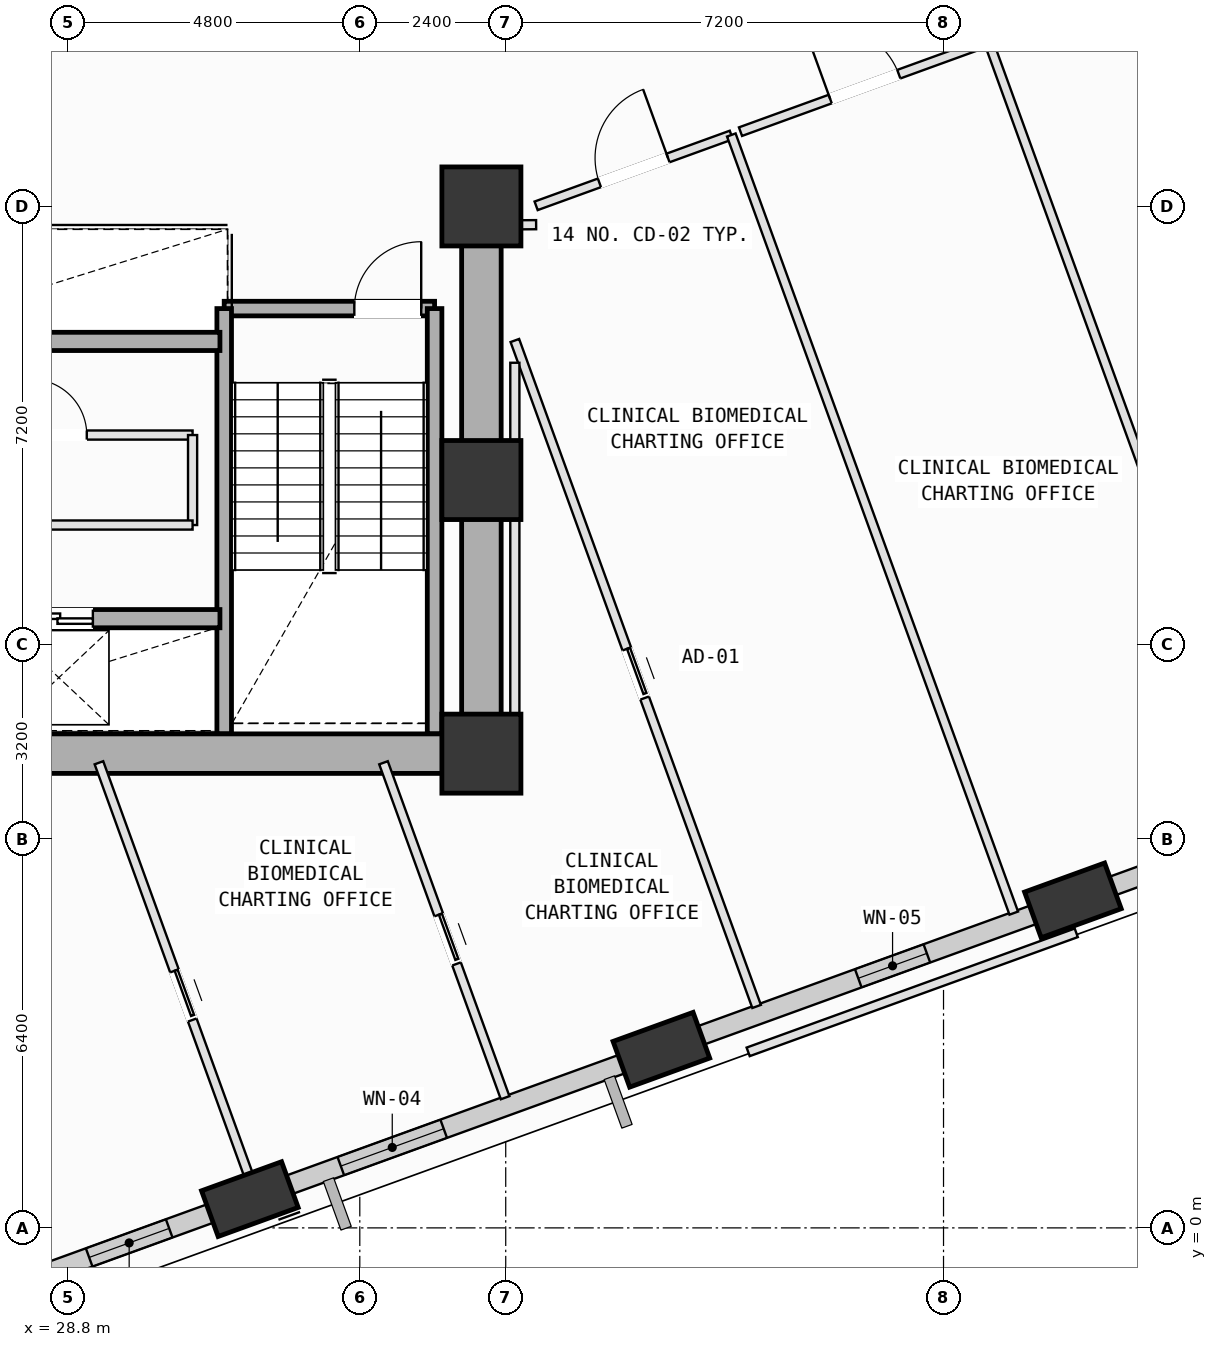
"""IFC4 building model, lengths in metres.
Left out: names, types, materials, properties, quantities, classifications, styles, units other than length and angle.
Written with IfcOpenShell. Run it as: python <this file> out.ifc"""

import sys

from ifc_helpers import new_model, si_unit, direction, frame, frame_2d, origin, origin_2d, place, context, subcontext, project, spatial, rectangle, extrude, element, fill, save


model = new_model("IFC4")
c1 = context("Model", 3, precision=1e-05, world=origin(), true_north=direction((0.0, 1.0)))
c2 = subcontext(c1, "Body", "Model", "MODEL_VIEW")
j1 = project(units=[si_unit("LENGTHUNIT", "METRE"), si_unit("PLANEANGLEUNIT", "RADIAN")], contexts=[c1])
p1 = place(None, origin())
s1 = spatial("IfcSite", under=j1, at=p1, CompositionType="ELEMENT")
p2 = place(p1, origin())
s2 = spatial("IfcBuilding", under=s1, at=p2, CompositionType="ELEMENT")
p3 = place(p2, frame((0.0, 0.0, 108.4)))
s3 = spatial("IfcBuildingStorey", under=s2, at=p3, CompositionType="ELEMENT", Elevation=108.4)
for number, where, z_axis, x_axis in (
    (1, (35.6, 7.8, 0.0), (0.0, 0.0, 1.0), (1.0, 0.0, 0.0)),
    (2, (35.6, 12.3, 0.0), (0.0, 0.0, 1.0), (1.0, 0.0, 0.0)),
    (3, (35.6, 16.8, 0.0), (0.0, 0.0, 1.0), (1.0, 0.0, 0.0)),
):
    element("IfcColumn", number, at=place(p3, frame(where, z_axis=z_axis, x_axis=x_axis)), inside=s3, PredefinedType="COLUMN", context=c2, shape_type="SweptSolid", body=[
        extrude(rectangle(XDim=1.3, YDim=1.3, at=origin_2d()), origin(), (0.0, 0.0, 1.0), 4.0),
    ])
p4 = place(p3, frame((31.792, 0.473, 0.002), z_axis=(0.100410199707, -0.006625128189, 0.994924067189), x_axis=(-0.276844928349, 0.960301010677, 0.034334451206)))
e4 = element("IfcColumn", 4, at=p4, inside=s3, PredefinedType="COLUMN", context=c2, shape_type="SweptSolid", body=[
    extrude(rectangle(XDim=1.4, YDim=0.8, at=origin_2d()), origin(), (0.0, 0.0, 1.0), 4.017),
])
p5 = place(p3, frame((38.56, 2.93, 0.002), z_axis=(0.090087537586, 0.02122927118, 0.995707564306), x_axis=(-0.546282636137, 0.837005375033, 0.03157979768)))
e5 = element("IfcColumn", 5, at=p5, inside=s3, PredefinedType="COLUMN", context=c2, shape_type="SweptSolid", body=[
    extrude(rectangle(XDim=1.4, YDim=0.8, at=origin_2d()), origin(), (0.0, 0.0, 1.0), 4.014),
])
p6 = place(p3, frame((45.328, 5.386, 0.002), z_axis=(0.079678110457, 0.049084148961, 0.9956114428), x_axis=(-0.78224874538, 0.62214735669, 0.031930657927)))
e6 = element("IfcColumn", 6, at=p6, inside=s3, PredefinedType="COLUMN", context=c2, shape_type="SweptSolid", body=[
    extrude(rectangle(XDim=1.4, YDim=0.8, at=origin_2d()), origin(), (0.0, 0.0, 1.0), 4.014),
])
p7 = place(p3, frame((31.506, 0.369, 0.0), z_axis=(0.0, 0.0, 1.0), x_axis=(-0.939986506667, -0.341211616572, 0.0)))
e7 = element("IfcWall", 7, at=p7, inside=s3, PredefinedType="SOLIDWALL", context=c2, shape_type="SweptSolid", body=[
    extrude(rectangle(XDim=6.234, YDim=0.32, at=frame_2d((3.117, 0.0))), origin(), (0.0, 0.0, 1.0), 3.165),
])
p8 = place(p7, frame((1.107, 0.0, 0.75)))
e8 = element("IfcOpeningElement", 8, at=p8, cuts=e7, PredefinedType="OPENING", context=c2, shape_type="SweptSolid", body=[
    extrude(rectangle(XDim=1.4, YDim=1.85, at=frame_2d((0.7, 0.925))), frame((0.0, 0.17, 0.0), z_axis=(0.0, -1.0, 0.0), x_axis=(1.0, 0.0, 0.0)), (0.0, 0.0, 1.0), 0.34),
])
p9 = place(p3, frame((38.267, 2.824, 0.0), z_axis=(0.0, 0.0, 1.0), x_axis=(-0.939987127701, -0.341209905713, 0.0)))
e9 = element("IfcWall", 9, at=p9, inside=s3, PredefinedType="SOLIDWALL", context=c2, shape_type="SweptSolid", body=[
    extrude(rectangle(XDim=6.214, YDim=0.32, at=frame_2d((3.107, 0.0))), origin(), (0.0, 0.0, 1.0), 3.165),
])
p10 = place(p9, frame((3.497, 0.0, 0.75)))
e10 = element("IfcOpeningElement", 10, at=p10, cuts=e9, PredefinedType="OPENING", context=c2, shape_type="SweptSolid", body=[
    extrude(rectangle(XDim=1.8, YDim=2.05, at=frame_2d((0.9, 1.025))), frame((0.0, 0.17, 0.0), z_axis=(0.0, -1.0, 0.0), x_axis=(1.0, 0.0, 0.0)), (0.0, 0.0, 1.0), 0.34),
])
p11 = place(p3, frame((45.036, 5.281, 0.0), z_axis=(0.0, 0.0, 1.0), x_axis=(-0.93999646123, -0.341184192006, 0.0)))
e11 = element("IfcWall", 11, at=p11, inside=s3, PredefinedType="SOLIDWALL", context=c2, shape_type="SweptSolid", body=[
    extrude(rectangle(XDim=6.209, YDim=0.32, at=frame_2d((3.104, 0.0))), origin(), (0.0, 0.0, 1.0), 3.165),
])
p12 = place(p11, frame((2.244, 0.0, 0.75)))
e12 = element("IfcOpeningElement", 12, at=p12, cuts=e11, PredefinedType="OPENING", context=c2, shape_type="SweptSolid", body=[
    extrude(rectangle(XDim=1.2, YDim=1.75, at=frame_2d((0.6, 0.875))), frame((0.0, 0.17, 0.0), z_axis=(0.0, -1.0, 0.0), x_axis=(1.0, 0.0, 0.0)), (0.0, 0.0, 1.0), 0.34),
])
p13 = place(p3, frame((51.811, 7.74, 0.0), z_axis=(0.0, 0.0, 1.0), x_axis=(-0.939992730325, -0.341194470846, 0.0)))
e13 = element("IfcWall", 13, at=p13, inside=s3, PredefinedType="SOLIDWALL", context=c2, shape_type="SweptSolid", body=[
    extrude(rectangle(XDim=6.218, YDim=0.32, at=frame_2d((3.109, 0.0))), origin(), (0.0, 0.0, 1.0), 3.165),
])
p14 = place(p13, frame((0.708, 0.0, 0.75)))
e14 = element("IfcOpeningElement", 14, at=p14, cuts=e13, PredefinedType="OPENING", context=c2, shape_type="SweptSolid", body=[
    extrude(rectangle(XDim=1.6, YDim=1.95, at=frame_2d((0.8, 0.975))), frame((0.0, 0.17, 0.0), z_axis=(0.0, -1.0, 0.0), x_axis=(1.0, 0.0, 0.0)), (0.0, 0.0, 1.0), 0.34),
])
p15 = place(p3, frame((31.37, 15.12, 0.0), z_axis=(0.0, 0.0, 1.0), x_axis=(1.0, 0.0, 0.0)))
e15 = element("IfcWall", 15, at=p15, inside=s3, PredefinedType="SOLIDWALL", context=c2, shape_type="SweptSolid", body=[
    extrude(rectangle(XDim=3.46, YDim=0.24, at=frame_2d((1.73, 0.0))), origin(), (0.0, 0.0, 1.0), 3.78),
])
p16 = place(p15, frame((2.14, 0.0, 0.0)))
e16 = element("IfcOpeningElement", 16, at=p16, cuts=e15, PredefinedType="OPENING", context=c2, shape_type="SweptSolid", body=[
    extrude(rectangle(XDim=1.1, YDim=2.15, at=frame_2d((0.55, 1.075))), frame((0.0, 0.13, 0.0), z_axis=(0.0, -1.0, 0.0), x_axis=(1.0, 0.0, 0.0)), (0.0, 0.0, 1.0), 0.26),
])
for number, where, z_axis, x_axis in (
    (17, (34.83, 15.12, 0.0), (0.0, 0.0, 1.0), (0.0, -1.0, 0.0)),
    (18, (31.37, 8.125, 0.0), (0.0, 0.0, 1.0), (0.0, 1.0, 0.0)),
):
    element("IfcWall", number, at=place(p3, frame(where, z_axis=z_axis, x_axis=x_axis)), inside=s3, PredefinedType="SOLIDWALL", context=c2, shape_type="SweptSolid", body=[
        extrude(rectangle(XDim=6.995, YDim=0.24, at=frame_2d((3.498, 0.0))), origin(), (0.0, 0.0, 1.0), 3.78),
    ])
p17 = place(p3, frame((24.8, 7.8, 0.0), z_axis=(0.0, 0.0, 1.0), x_axis=(1.0, 0.0, 0.0)))
e19 = element("IfcWall", 19, at=p17, inside=s3, PredefinedType="SHEAR", context=c2, shape_type="SweptSolid", body=[
    extrude(rectangle(XDim=10.8, YDim=0.65, at=frame_2d((5.4, 0.0))), origin(), (0.0, 0.0, 1.0), 3.78),
])
p18 = place(p3, frame((35.6, 7.8, 0.0), z_axis=(0.0, 0.0, 1.0), x_axis=(0.0, 1.0, 0.0)))
e20 = element("IfcWall", 20, at=p18, inside=s3, PredefinedType="SHEAR", context=c2, shape_type="SweptSolid", body=[
    extrude(rectangle(XDim=9.0, YDim=0.65, at=frame_2d((4.5, 0.0))), origin(), (0.0, 0.0, 1.0), 3.78),
])
p19 = place(p3, frame((25.85, 10.02, 0.0), z_axis=(0.0, 0.0, 1.0), x_axis=(1.0, 0.0, 0.0)))
e21 = element("IfcWall", 21, at=p19, inside=s3, PredefinedType="SOLIDWALL", context=c2, shape_type="SweptSolid", body=[
    extrude(rectangle(XDim=5.45, YDim=0.3, at=frame_2d((2.725, 0.0))), origin(), (0.0, 0.0, 1.0), 3.78),
])
p20 = place(p19, frame((0.34, 0.0, 0.0)))
e22 = element("IfcOpeningElement", 22, at=p20, cuts=e21, PredefinedType="OPENING", context=c2, shape_type="SweptSolid", body=[
    extrude(rectangle(XDim=1.12, YDim=2.15, at=frame_2d((0.56, 1.075))), frame((0.0, 0.16, 0.0), z_axis=(0.0, -1.0, 0.0), x_axis=(1.0, 0.0, 0.0)), (0.0, 0.0, 1.0), 0.32),
])
p21 = place(p19, frame((2.24, 0.0, 0.0)))
e23 = element("IfcOpeningElement", 23, at=p21, cuts=e21, PredefinedType="OPENING", context=c2, shape_type="SweptSolid", body=[
    extrude(rectangle(XDim=1.12, YDim=2.15, at=frame_2d((0.56, 1.075))), frame((0.0, 0.16, 0.0), z_axis=(0.0, -1.0, 0.0), x_axis=(1.0, 0.0, 0.0)), (0.0, 0.0, 1.0), 0.32),
])
p22 = place(p3, frame((25.85, 14.58, 0.0), z_axis=(0.0, 0.0, 1.0), x_axis=(1.0, 0.0, 0.0)))
e24 = element("IfcWall", 24, at=p22, inside=s3, PredefinedType="SOLIDWALL", context=c2, shape_type="SweptSolid", body=[
    extrude(rectangle(XDim=5.45, YDim=0.3, at=frame_2d((2.725, 0.0))), origin(), (0.0, 0.0, 1.0), 3.78),
])
p23 = place(p3, frame((26.45, 13.04, 0.0), z_axis=(0.0, 0.0, 1.0), x_axis=(1.0, 0.0, 0.0)))
e25 = element("IfcWall", 25, at=p23, inside=s3, PredefinedType="PARTITIONING", context=c2, shape_type="SweptSolid", body=[
    extrude(rectangle(XDim=4.4, YDim=0.15, at=frame_2d((2.2, 0.0))), origin(), (0.0, 0.0, 1.0), 3.78),
])
p24 = place(p23, frame((1.74, 0.0, 0.0)))
e26 = element("IfcOpeningElement", 26, at=p24, cuts=e25, PredefinedType="OPENING", context=c2, shape_type="SweptSolid", body=[
    extrude(rectangle(XDim=0.92, YDim=2.1, at=frame_2d((0.46, 1.05))), frame((0.0, 0.085, 0.0), z_axis=(0.0, -1.0, 0.0), x_axis=(1.0, 0.0, 0.0)), (0.0, 0.0, 1.0), 0.17),
])
p25 = place(p3, frame((30.85, 13.04, 0.0), z_axis=(0.0, 0.0, 1.0), x_axis=(0.0, -1.0, 0.0)))
e27 = element("IfcWall", 27, at=p25, inside=s3, PredefinedType="PARTITIONING", context=c2, shape_type="SweptSolid", body=[
    extrude(rectangle(XDim=1.48, YDim=0.15, at=frame_2d((0.74, 0.0))), origin(), (0.0, 0.0, 1.0), 3.78),
])
p26 = place(p3, frame((30.85, 11.56, 0.0), z_axis=(0.0, 0.0, 1.0), x_axis=(-1.0, 0.0, 0.0)))
e28 = element("IfcWall", 28, at=p26, inside=s3, PredefinedType="PARTITIONING", context=c2, shape_type="SweptSolid", body=[
    extrude(rectangle(XDim=4.4, YDim=0.15, at=frame_2d((2.2, 0.0))), origin(), (0.0, 0.0, 1.0), 3.78),
])
p27 = place(p3, frame((29.31, 7.65, 0.0), z_axis=(0.0, 0.0, 1.0), x_axis=(0.341041356656, -0.940048292935, 0.0)))
e29 = element("IfcWall", 29, at=p27, inside=s3, PredefinedType="PARTITIONING", context=c2, shape_type="SweptSolid", body=[
    extrude(rectangle(XDim=7.823, YDim=0.15, at=frame_2d((3.912, 0.0))), origin(), (0.0, 0.0, 1.0), 3.78),
])
p28 = place(p27, frame((3.641, 0.0, 0.0)))
e30 = element("IfcOpeningElement", 30, at=p28, cuts=e29, PredefinedType="OPENING", context=c2, shape_type="SweptSolid", body=[
    extrude(rectangle(XDim=0.86, YDim=2.06, at=frame_2d((0.43, 1.03))), frame((0.0, 0.085, 0.0), z_axis=(0.0, -1.0, 0.0), x_axis=(1.0, 0.0, 0.0)), (0.0, 0.0, 1.0), 0.17),
])
p29 = place(p3, frame((33.99, 7.65, 0.0), z_axis=(0.0, 0.0, 1.0), x_axis=(0.341261367951, -0.939968445611, 0.0)))
e31 = element("IfcWall", 31, at=p29, inside=s3, PredefinedType="PARTITIONING", context=c2, shape_type="SweptSolid", body=[
    extrude(rectangle(XDim=5.861, YDim=0.15, at=frame_2d((2.93, 0.0))), origin(), (0.0, 0.0, 1.0), 3.78),
])
p30 = place(p29, frame((2.66, 0.0, 0.0)))
e32 = element("IfcOpeningElement", 32, at=p30, cuts=e31, PredefinedType="OPENING", context=c2, shape_type="SweptSolid", body=[
    extrude(rectangle(XDim=0.86, YDim=2.06, at=frame_2d((0.43, 1.03))), frame((0.0, 0.085, 0.0), z_axis=(0.0, -1.0, 0.0), x_axis=(1.0, 0.0, 0.0)), (0.0, 0.0, 1.0), 0.17),
])
p31 = place(p3, frame((36.15, 14.595, 0.0), z_axis=(0.0, 0.0, 1.0), x_axis=(0.341228228972, -0.939980476261, 0.0)))
e33 = element("IfcWall", 33, at=p31, inside=s3, PredefinedType="PARTITIONING", context=c2, shape_type="SweptSolid", body=[
    extrude(rectangle(XDim=11.652, YDim=0.15, at=frame_2d((5.826, 0.0))), origin(), (0.0, 0.0, 1.0), 3.78),
])
p32 = place(p31, frame((5.396, 0.0, 0.0)))
e34 = element("IfcOpeningElement", 34, at=p32, cuts=e33, PredefinedType="OPENING", context=c2, shape_type="SweptSolid", body=[
    extrude(rectangle(XDim=0.86, YDim=2.06, at=frame_2d((0.43, 1.03))), frame((0.0, 0.085, 0.0), z_axis=(0.0, -1.0, 0.0), x_axis=(1.0, 0.0, 0.0)), (0.0, 0.0, 1.0), 0.17),
])
p33 = place(p3, frame((39.278, 2.946, 0.0), z_axis=(0.0, 0.0, 1.0), x_axis=(-0.94005912582, -0.341011495354, 0.0)))
e35 = element("IfcWall", 35, at=p33, inside=s3, PredefinedType="PARTITIONING", context=c2, shape_type="SweptSolid", body=[
    extrude(rectangle(XDim=0.991, YDim=0.15, at=frame_2d((0.496, 0.0))), origin(), (0.0, 0.0, 1.0), 3.165),
])
p34 = place(p3, frame((35.6, 7.5, 0.0), z_axis=(0.0, 0.0, 1.0), x_axis=(1.0, 0.0, 0.0)))
e36 = element("IfcWall", 36, at=p34, inside=s3, PredefinedType="PARTITIONING", context=c2, shape_type="SweptSolid", body=[
    extrude(rectangle(XDim=0.55, YDim=0.15, at=frame_2d((0.275, 0.0))), origin(), (0.0, 0.0, 1.0), 2.965),
])
p35 = place(p3, frame((36.15, 7.5, 0.0), z_axis=(0.0, 0.0, 1.0), x_axis=(0.0, 1.0, 0.0)))
e37 = element("IfcWall", 37, at=p35, inside=s3, PredefinedType="PARTITIONING", context=c2, shape_type="SweptSolid", body=[
    extrude(rectangle(XDim=6.729, YDim=0.15, at=frame_2d((3.365, 0.0))), origin(), (0.0, 0.0, 1.0), 3.78),
])
p36 = place(p3, frame((35.631, 16.494, 0.0), z_axis=(0.0, 0.0, 1.0), x_axis=(0.999975329499, 0.007024271772, 0.0)))
e38 = element("IfcWall", 38, at=p36, inside=s3, PredefinedType="PARTITIONING", context=c2, shape_type="SweptSolid", body=[
    extrude(rectangle(XDim=0.869, YDim=0.15, at=frame_2d((0.435, 0.0))), origin(), (0.0, 0.0, 1.0), 2.965),
])
p37 = place(p3, frame((36.5, 16.81, 0.0), z_axis=(0.0, 0.0, 1.0), x_axis=(0.94000198953, 0.341168960605, 0.0)))
e39 = element("IfcWall", 39, at=p37, inside=s3, PredefinedType="PARTITIONING", context=c2, shape_type="SweptSolid", body=[
    extrude(rectangle(XDim=3.415, YDim=0.15, at=frame_2d((1.708, 0.0))), origin(), (0.0, 0.0, 1.0), 2.965),
])
p38 = place(p37, frame((1.107, 0.0, 0.0)))
e40 = element("IfcOpeningElement", 40, at=p38, cuts=e39, PredefinedType="OPENING", context=c2, shape_type="SweptSolid", body=[
    extrude(rectangle(XDim=1.2, YDim=2.15, at=frame_2d((0.6, 1.075))), frame((0.0, 0.085, 0.0), z_axis=(0.0, -1.0, 0.0), x_axis=(1.0, 0.0, 0.0)), (0.0, 0.0, 1.0), 0.17),
])
p39 = place(p3, frame((39.71, 17.975, 0.0), z_axis=(0.0, 0.0, 1.0), x_axis=(0.341169968064, -0.940001623877, 0.0)))
e41 = element("IfcWall", 41, at=p39, inside=s3, PredefinedType="PARTITIONING", context=c2, shape_type="SweptSolid", body=[
    extrude(rectangle(XDim=13.615, YDim=0.15, at=frame_2d((6.808, 0.0))), origin(), (0.0, 0.0, 1.0), 3.78),
])
p40 = place(p3, frame((39.861, 18.03, 0.0), z_axis=(0.0, 0.0, 1.0), x_axis=(0.939960863027, 0.341282252656, 0.0)))
e42 = element("IfcWall", 42, at=p40, inside=s3, PredefinedType="PARTITIONING", context=c2, shape_type="SweptSolid", body=[
    extrude(rectangle(XDim=4.339, YDim=0.15, at=frame_2d((2.17, 0.0))), origin(), (0.0, 0.0, 1.0), 2.965),
])
p41 = place(p40, frame((1.57, 0.0, 0.0)))
e43 = element("IfcOpeningElement", 43, at=p41, cuts=e42, PredefinedType="OPENING", context=c2, shape_type="SweptSolid", body=[
    extrude(rectangle(XDim=1.2, YDim=2.15, at=frame_2d((0.6, 1.075))), frame((0.0, 0.085, 0.0), z_axis=(0.0, -1.0, 0.0), x_axis=(1.0, 0.0, 0.0)), (0.0, 0.0, 1.0), 0.17),
])
p42 = place(p3, frame((43.94, 19.511, 0.0), z_axis=(0.0, 0.0, 1.0), x_axis=(0.341233344025, -0.939978619398, 0.0)))
e44 = element("IfcWall", 44, at=p42, inside=s3, PredefinedType="PARTITIONING", context=c2, shape_type="SweptSolid", body=[
    extrude(rectangle(XDim=13.615, YDim=0.15, at=frame_2d((6.808, 0.0))), origin(), (0.0, 0.0, 1.0), 3.78),
])
p43 = place(p3, frame((46.044, 5.402, 0.0), z_axis=(0.0, 0.0, 1.0), x_axis=(-0.939800627122, -0.341723252445, 0.0)))
e45 = element("IfcWall", 45, at=p43, inside=s3, PredefinedType="PARTITIONING", context=c2, shape_type="SweptSolid", body=[
    extrude(rectangle(XDim=0.99, YDim=0.15, at=frame_2d((0.495, 0.0))), origin(), (0.0, 0.0, 1.0), 3.165),
])
p44 = place(p3, frame((45.383, 4.853, 0.0), z_axis=(0.0, 0.0, 1.0), x_axis=(-0.940026660647, -0.341100978119, 0.0)))
e46 = element("IfcWall", 46, at=p44, inside=s3, PredefinedType="PARTITIONING", context=c2, shape_type="SweptSolid", body=[
    extrude(rectangle(XDim=5.74, YDim=0.15, at=frame_2d((2.87, 0.0))), origin(), (0.0, 0.0, 1.0), 3.78),
])
p45 = place(p8, origin())
e47 = element("IfcWindow", 47, at=p45, inside=s3, PartitioningType="SINGLE_PANEL", PredefinedType="WINDOW", context=c2, shape_type="SweptSolid", body=[
    extrude(rectangle(XDim=1.4, YDim=1.85, at=frame_2d((0.7, 0.925))), frame((0.0, 0.03, 0.0), z_axis=(0.0, -1.0, 0.0), x_axis=(1.0, 0.0, 0.0)), (0.0, 0.0, 1.0), 0.06),
])
fill(e8, e47)
p46 = place(p10, origin())
e48 = element("IfcWindow", 48, at=p46, inside=s3, PartitioningType="SINGLE_PANEL", PredefinedType="WINDOW", context=c2, shape_type="SweptSolid", body=[
    extrude(rectangle(XDim=1.8, YDim=2.05, at=frame_2d((0.9, 1.025))), frame((0.0, 0.03, 0.0), z_axis=(0.0, -1.0, 0.0), x_axis=(1.0, 0.0, 0.0)), (0.0, 0.0, 1.0), 0.06),
])
fill(e10, e48)
p47 = place(p12, origin())
e49 = element("IfcWindow", 49, at=p47, inside=s3, PartitioningType="SINGLE_PANEL", PredefinedType="WINDOW", context=c2, shape_type="SweptSolid", body=[
    extrude(rectangle(XDim=1.2, YDim=1.75, at=frame_2d((0.6, 0.875))), frame((0.0, 0.03, 0.0), z_axis=(0.0, -1.0, 0.0), x_axis=(1.0, 0.0, 0.0)), (0.0, 0.0, 1.0), 0.06),
])
fill(e12, e49)
p48 = place(p16, origin())
e50 = element("IfcDoor", 50, at=p48, inside=s3, OperationType="SINGLE_SWING_RIGHT", PredefinedType="DOOR", context=c2, shape_type="SweptSolid", body=[
    extrude(rectangle(XDim=1.1, YDim=2.15, at=frame_2d((0.55, 1.075))), frame((0.0, 0.025, 0.0), z_axis=(0.0, -1.0, 0.0), x_axis=(1.0, 0.0, 0.0)), (0.0, 0.0, 1.0), 0.05),
])
fill(e16, e50)
p49 = place(p21, origin())
e51 = element("IfcDoor", 51, at=p49, inside=s3, OperationType="DOUBLE_DOOR_SLIDING", PredefinedType="DOOR", context=c2, shape_type="SweptSolid", body=[
    extrude(rectangle(XDim=1.12, YDim=2.15, at=frame_2d((0.56, 1.075))), frame((0.0, 0.025, 0.0), z_axis=(0.0, -1.0, 0.0), x_axis=(1.0, 0.0, 0.0)), (0.0, 0.0, 1.0), 0.05),
])
fill(e23, e51)
p50 = place(p24, origin())
e52 = element("IfcDoor", 52, at=p50, inside=s3, OperationType="SINGLE_SWING_LEFT", PredefinedType="DOOR", context=c2, shape_type="SweptSolid", body=[
    extrude(rectangle(XDim=0.92, YDim=2.1, at=frame_2d((0.46, 1.05))), frame((0.0, 0.025, 0.0), z_axis=(0.0, -1.0, 0.0), x_axis=(1.0, 0.0, 0.0)), (0.0, 0.0, 1.0), 0.05),
])
fill(e26, e52)
p51 = place(p38, origin())
e53 = element("IfcDoor", 53, at=p51, inside=s3, OperationType="SINGLE_SWING_RIGHT", PredefinedType="DOOR", context=c2, shape_type="SweptSolid", body=[
    extrude(rectangle(XDim=1.2, YDim=2.15, at=frame_2d((0.6, 1.075))), frame((0.0, 0.025, 0.0), z_axis=(0.0, -1.0, 0.0), x_axis=(1.0, 0.0, 0.0)), (0.0, 0.0, 1.0), 0.05),
])
fill(e40, e53)
p52 = place(p41, origin())
e54 = element("IfcDoor", 54, at=p52, inside=s3, OperationType="SINGLE_SWING_LEFT", PredefinedType="DOOR", context=c2, shape_type="SweptSolid", body=[
    extrude(rectangle(XDim=1.2, YDim=2.15, at=frame_2d((0.6, 1.075))), frame((0.0, 0.025, 0.0), z_axis=(0.0, -1.0, 0.0), x_axis=(1.0, 0.0, 0.0)), (0.0, 0.0, 1.0), 0.05),
])
fill(e43, e54)
p53 = place(p32, origin())
e55 = element("IfcDoor", 55, at=p53, inside=s3, OperationType="SLIDING_TO_LEFT", PredefinedType="DOOR", context=c2, shape_type="SweptSolid", body=[
    extrude(rectangle(XDim=0.86, YDim=2.06, at=frame_2d((0.43, 1.03))), frame((0.0, 0.025, 0.0), z_axis=(0.0, -1.0, 0.0), x_axis=(1.0, 0.0, 0.0)), (0.0, 0.0, 1.0), 0.05),
])
fill(e34, e55)
p54 = place(p30, origin())
e56 = element("IfcDoor", 56, at=p54, inside=s3, OperationType="SLIDING_TO_LEFT", PredefinedType="DOOR", context=c2, shape_type="SweptSolid", body=[
    extrude(rectangle(XDim=0.86, YDim=2.06, at=frame_2d((0.43, 1.03))), frame((0.0, 0.025, 0.0), z_axis=(0.0, -1.0, 0.0), x_axis=(1.0, 0.0, 0.0)), (0.0, 0.0, 1.0), 0.05),
])
fill(e32, e56)
p55 = place(p28, origin())
e57 = element("IfcDoor", 57, at=p55, inside=s3, OperationType="SLIDING_TO_LEFT", PredefinedType="DOOR", context=c2, shape_type="SweptSolid", body=[
    extrude(rectangle(XDim=0.86, YDim=2.06, at=frame_2d((0.43, 1.03))), frame((0.0, 0.025, 0.0), z_axis=(0.0, -1.0, 0.0), x_axis=(1.0, 0.0, 0.0)), (0.0, 0.0, 1.0), 0.05),
])
fill(e30, e57)
save(model, sys.argv[1])
